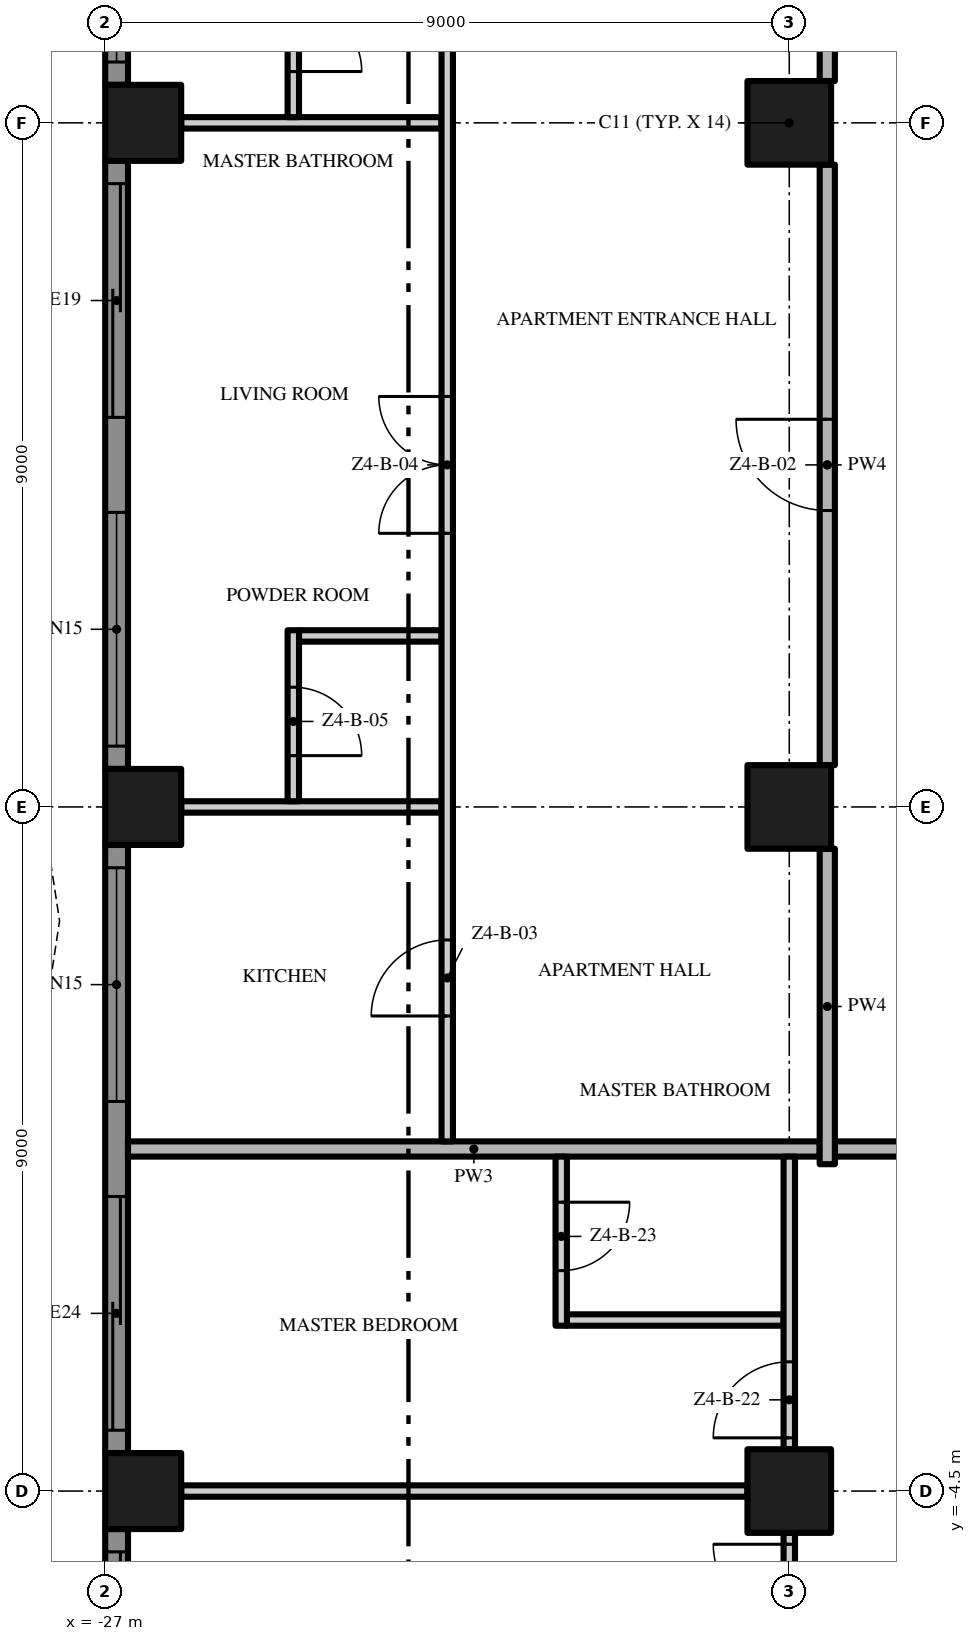
"""IFC4 building model, lengths in metres.
Left out: names, types, materials, properties, quantities, classifications, styles, units other than length and angle.
Written with IfcOpenShell. Run it as: python <this file> out.ifc"""

import sys

from ifc_helpers import new_model, si_unit, direction, frame, frame_2d, origin, origin_2d, place, context, subcontext, project, spatial, polyline, rectangle, outline, extrude, element, fill, save


model = new_model("IFC4")
c1 = context("Model", 3, precision=1e-05, world=origin(), true_north=direction((0.0, 1.0)))
c2 = subcontext(c1, "Body", "Model", "MODEL_VIEW")
j1 = project(units=[si_unit("LENGTHUNIT", "METRE"), si_unit("PLANEANGLEUNIT", "RADIAN")], contexts=[c1])
p1 = place(None, origin())
s1 = spatial("IfcSite", under=j1, at=p1, CompositionType="ELEMENT")
p2 = place(p1, origin())
s2 = spatial("IfcBuilding", under=s1, at=p2, CompositionType="ELEMENT")
p3 = place(p2, frame((0.0, 0.0, 203.4)))
s3 = spatial("IfcBuildingStorey", under=s2, at=p3, CompositionType="ELEMENT", Elevation=203.4)
for number, where, z_axis, x_axis in (
    (1, (-18.0, -4.5, 0.0), (0.0, 0.0, 1.0), (1.0, 0.0, 0.0)),
    (2, (-18.0, 13.5, 0.0), (0.0, 0.0, 1.0), (1.0, 0.0, 0.0)),
    (3, (-18.0, 4.5, 0.0), (0.0, 0.0, 1.0), (1.0, 0.0, 0.0)),
):
    element("IfcColumn", number, at=place(p3, frame(where, z_axis=z_axis, x_axis=x_axis)), inside=s3, PredefinedType="COLUMN", context=c2, shape_type="SweptSolid", body=[
        extrude(rectangle(XDim=1.1, YDim=1.1, at=origin_2d()), origin(), (0.0, 0.0, 1.0), 3.5),
    ])
for number, where, z_axis, x_axis in (
    (4, (-26.5, -4.5, 0.0), (0.0, 0.0, 1.0), (1.0, 0.0, 0.0)),
    (5, (-26.5, 13.5, 0.0), (0.0, 0.0, 1.0), (1.0, 0.0, 0.0)),
    (6, (-26.5, 4.5, 0.0), (0.0, 0.0, 1.0), (1.0, 0.0, 0.0)),
):
    element("IfcColumn", number, at=place(p3, frame(where, z_axis=z_axis, x_axis=x_axis)), inside=s3, PredefinedType="COLUMN", context=c2, shape_type="SweptSolid", body=[
        extrude(rectangle(XDim=1.0, YDim=1.0, at=origin_2d()), origin(), (0.0, 0.0, 1.0), 3.5),
    ])
p4 = place(p3, frame((-26.85, 14.0, 0.0), z_axis=(0.0, 0.0, 1.0), x_axis=(0.0, 1.0, 0.0)))
e7 = element("IfcWall", 7, at=p4, inside=s3, PredefinedType="SOLIDWALL", context=c2, shape_type="SweptSolid", body=[
    extrude(rectangle(XDim=3.7, YDim=0.3, at=frame_2d((1.85, 0.0))), origin(), (0.0, 0.0, 1.0), 3.5),
])
p5 = place(p4, frame((0.3, 0.0, 0.45)))
e8 = element("IfcOpeningElement", 8, at=p5, cuts=e7, PredefinedType="OPENING", context=c2, shape_type="SweptSolid", body=[
    extrude(rectangle(XDim=3.075, YDim=2.65, at=frame_2d((1.538, 1.325))), frame((0.0, 0.16, 0.0), z_axis=(0.0, -1.0, 0.0), x_axis=(1.0, 0.0, 0.0)), (0.0, 0.0, 1.0), 0.32),
])
p6 = place(p3, frame((-26.85, 5.0, 0.0), z_axis=(0.0, 0.0, 1.0), x_axis=(0.0, 1.0, 0.0)))
e9 = element("IfcWall", 9, at=p6, inside=s3, PredefinedType="SOLIDWALL", context=c2, shape_type="SweptSolid", body=[
    extrude(rectangle(XDim=8.0, YDim=0.3, at=frame_2d((4.0, 0.0))), origin(), (0.0, 0.0, 1.0), 3.5),
])
p7 = place(p6, frame((4.625, 0.0, 0.0)))
e10 = element("IfcOpeningElement", 10, at=p7, cuts=e9, PredefinedType="OPENING", context=c2, shape_type="SweptSolid", body=[
    extrude(rectangle(XDim=3.075, YDim=2.4, at=frame_2d((1.538, 1.2))), frame((0.0, 0.16, 0.0), z_axis=(0.0, -1.0, 0.0), x_axis=(1.0, 0.0, 0.0)), (0.0, 0.0, 1.0), 0.32),
])
p8 = place(p6, frame((0.3, 0.0, 0.45)))
e11 = element("IfcOpeningElement", 11, at=p8, cuts=e9, PredefinedType="OPENING", context=c2, shape_type="SweptSolid", body=[
    extrude(rectangle(XDim=3.075, YDim=2.65, at=frame_2d((1.538, 1.325))), frame((0.0, 0.16, 0.0), z_axis=(0.0, -1.0, 0.0), x_axis=(1.0, 0.0, 0.0)), (0.0, 0.0, 1.0), 0.32),
])
p9 = place(p3, frame((-26.85, -4.0, 0.0), z_axis=(0.0, 0.0, 1.0), x_axis=(0.0, 1.0, 0.0)))
e12 = element("IfcWall", 12, at=p9, inside=s3, PredefinedType="SOLIDWALL", context=c2, shape_type="SweptSolid", body=[
    extrude(rectangle(XDim=8.0, YDim=0.3, at=frame_2d((4.0, 0.0))), origin(), (0.0, 0.0, 1.0), 3.5),
])
p10 = place(p9, frame((4.625, 0.0, 0.45)))
e13 = element("IfcOpeningElement", 13, at=p10, cuts=e12, PredefinedType="OPENING", context=c2, shape_type="SweptSolid", body=[
    extrude(rectangle(XDim=3.075, YDim=2.65, at=frame_2d((1.538, 1.325))), frame((0.0, 0.16, 0.0), z_axis=(0.0, -1.0, 0.0), x_axis=(1.0, 0.0, 0.0)), (0.0, 0.0, 1.0), 0.32),
])
p11 = place(p9, frame((0.3, 0.0, 0.0)))
e14 = element("IfcOpeningElement", 14, at=p11, cuts=e12, PredefinedType="OPENING", context=c2, shape_type="SweptSolid", body=[
    extrude(rectangle(XDim=3.075, YDim=2.4, at=frame_2d((1.538, 1.2))), frame((0.0, 0.16, 0.0), z_axis=(0.0, -1.0, 0.0), x_axis=(1.0, 0.0, 0.0)), (0.0, 0.0, 1.0), 0.32),
])
p12 = place(p3, frame((-26.85, -13.0, 0.0), z_axis=(0.0, 0.0, 1.0), x_axis=(0.0, 1.0, 0.0)))
e15 = element("IfcWall", 15, at=p12, inside=s3, PredefinedType="SOLIDWALL", context=c2, shape_type="SweptSolid", body=[
    extrude(rectangle(XDim=8.0, YDim=0.3, at=frame_2d((4.0, 0.0))), origin(), (0.0, 0.0, 1.0), 3.5),
])
p13 = place(p12, frame((4.625, 0.0, 0.0)))
e16 = element("IfcOpeningElement", 16, at=p13, cuts=e15, PredefinedType="OPENING", context=c2, shape_type="SweptSolid", body=[
    extrude(rectangle(XDim=3.075, YDim=2.4, at=frame_2d((1.538, 1.2))), frame((0.0, 0.16, 0.0), z_axis=(0.0, -1.0, 0.0), x_axis=(1.0, 0.0, 0.0)), (0.0, 0.0, 1.0), 0.32),
])
p14 = place(p12, frame((0.3, 0.0, 0.45)))
e17 = element("IfcOpeningElement", 17, at=p14, cuts=e15, PredefinedType="OPENING", context=c2, shape_type="SweptSolid", body=[
    extrude(rectangle(XDim=3.075, YDim=2.65, at=frame_2d((1.538, 1.325))), frame((0.0, 0.16, 0.0), z_axis=(0.0, -1.0, 0.0), x_axis=(1.0, 0.0, 0.0)), (0.0, 0.0, 1.0), 0.32),
])
p15 = place(p3, origin())
e18 = element("IfcWall", 18, at=p15, inside=s3, PredefinedType="USERDEFINED", context=c2, shape_type="SweptSolid", body=[
    extrude(outline(polyline([(-27.6, 18.0), (-27.829, 16.5), (-28.429, 15.0), (-29.171, 13.5), (-29.771, 12.0), (-30.0, 10.5), (-29.771, 9.0), (-29.171, 7.5), (-28.429, 6.0), (-27.829, 4.5), (-27.6, 3.0), (-27.829, 1.5), (-28.429, 0.0), (-29.171, -1.5), (-29.771, -3.0), (-30.0, -4.5), (-29.771, -6.0), (-29.171, -7.5), (-28.429, -9.0), (-27.829, -10.5), (-27.6, -12.0), (-27.829, -13.5), (-28.429, -15.0), (-29.171, -16.5), (-29.771, -18.0), (-29.539, -18.093), (-28.942, -16.602), (-28.201, -15.102), (-27.586, -13.566), (-27.347, -12.0), (-27.586, -10.434), (-28.201, -8.898), (-28.942, -7.398), (-29.528, -5.934), (-29.747, -4.5), (-29.528, -3.066), (-28.942, -1.602), (-28.201, -0.102), (-27.586, 1.434), (-27.347, 3.0), (-27.586, 4.566), (-28.201, 6.102), (-28.942, 7.602), (-29.528, 9.066), (-29.747, 10.5), (-29.528, 11.934), (-28.942, 13.398), (-28.201, 14.898), (-27.586, 16.434), (-27.353, 17.962), (-27.6, 18.0)])), origin(), (0.0, 0.0, 1.0), 0.9),
])
p16 = place(p3, frame((-26.0, -4.5, 0.0), z_axis=(0.0, 0.0, 1.0), x_axis=(1.0, 0.0, 0.0)))
e19 = element("IfcWall", 19, at=p16, inside=s3, PredefinedType="PARTITIONING", context=c2, shape_type="SweptSolid", body=[
    extrude(rectangle(XDim=7.45, YDim=0.15, at=frame_2d((3.725, 0.0))), origin(), (0.0, 0.0, 1.0), 3.5),
])
p17 = place(p3, frame((-20.925, -2.25, 0.0), z_axis=(0.0, 0.0, 1.0), x_axis=(1.0, 0.0, 0.0)))
e20 = element("IfcWall", 20, at=p17, inside=s3, PredefinedType="PARTITIONING", context=c2, shape_type="SweptSolid", body=[
    extrude(rectangle(XDim=2.85, YDim=0.15, at=frame_2d((1.425, 0.0))), origin(), (0.0, 0.0, 1.0), 3.5),
])
p18 = place(p3, frame((-17.4, 0.0, 0.0), z_axis=(0.0, 0.0, 1.0), x_axis=(1.0, 0.0, 0.0)))
e21 = element("IfcWall", 21, at=p18, inside=s3, PredefinedType="PARTITIONING", context=c2, shape_type="SweptSolid", body=[
    extrude(rectangle(XDim=12.8, YDim=0.2, at=frame_2d((6.4, 0.0))), origin(), (0.0, 0.0, 1.0), 3.5),
])
p19 = place(p3, frame((-26.7, 0.0, 0.0), z_axis=(0.0, 0.0, 1.0), x_axis=(1.0, 0.0, 0.0)))
e22 = element("IfcWall", 22, at=p19, inside=s3, PredefinedType="PARTITIONING", context=c2, shape_type="SweptSolid", body=[
    extrude(rectangle(XDim=9.1, YDim=0.2, at=frame_2d((4.55, 0.0))), origin(), (0.0, 0.0, 1.0), 3.5),
])
p20 = place(p3, frame((-26.0, 4.5, 0.0), z_axis=(0.0, 0.0, 1.0), x_axis=(1.0, 0.0, 0.0)))
e23 = element("IfcWall", 23, at=p20, inside=s3, PredefinedType="PARTITIONING", context=c2, shape_type="SweptSolid", body=[
    extrude(rectangle(XDim=3.425, YDim=0.15, at=frame_2d((1.712, 0.0))), origin(), (0.0, 0.0, 1.0), 3.5),
])
p21 = place(p3, frame((-24.45, 6.75, 0.0), z_axis=(0.0, 0.0, 1.0), x_axis=(1.0, 0.0, 0.0)))
e24 = element("IfcWall", 24, at=p21, inside=s3, PredefinedType="PARTITIONING", context=c2, shape_type="SweptSolid", body=[
    extrude(rectangle(XDim=1.875, YDim=0.15, at=frame_2d((0.938, 0.0))), origin(), (0.0, 0.0, 1.0), 3.5),
])
p22 = place(p3, frame((-26.0, 13.5, 0.0), z_axis=(0.0, 0.0, 1.0), x_axis=(1.0, 0.0, 0.0)))
e25 = element("IfcWall", 25, at=p22, inside=s3, PredefinedType="PARTITIONING", context=c2, shape_type="SweptSolid", body=[
    extrude(rectangle(XDim=3.425, YDim=0.15, at=frame_2d((1.712, 0.0))), origin(), (0.0, 0.0, 1.0), 3.5),
])
p23 = place(p3, frame((-24.525, 6.825, 0.0), z_axis=(0.0, 0.0, 1.0), x_axis=(0.0, -1.0, 0.0)))
e26 = element("IfcWall", 26, at=p23, inside=s3, PredefinedType="PARTITIONING", context=c2, shape_type="SweptSolid", body=[
    extrude(rectangle(XDim=2.25, YDim=0.15, at=frame_2d((1.125, 0.0))), origin(), (0.0, 0.0, 1.0), 3.5),
])
p24 = place(p23, frame((0.75, 0.0, 0.0)))
e27 = element("IfcOpeningElement", 27, at=p24, cuts=e26, PredefinedType="OPENING", context=c2, shape_type="SweptSolid", body=[
    extrude(rectangle(XDim=0.9, YDim=2.1, at=frame_2d((0.45, 1.05))), frame((0.0, 0.085, 0.0), z_axis=(0.0, -1.0, 0.0), x_axis=(1.0, 0.0, 0.0)), (0.0, 0.0, 1.0), 0.17),
])
p25 = place(p3, frame((-24.525, 15.825, 0.0), z_axis=(0.0, 0.0, 1.0), x_axis=(0.0, -1.0, 0.0)))
e28 = element("IfcWall", 28, at=p25, inside=s3, PredefinedType="PARTITIONING", context=c2, shape_type="SweptSolid", body=[
    extrude(rectangle(XDim=2.25, YDim=0.15, at=frame_2d((1.125, 0.0))), origin(), (0.0, 0.0, 1.0), 3.5),
])
p26 = place(p25, frame((0.75, 0.0, 0.0)))
e29 = element("IfcOpeningElement", 29, at=p26, cuts=e28, PredefinedType="OPENING", context=c2, shape_type="SweptSolid", body=[
    extrude(rectangle(XDim=0.9, YDim=2.1, at=frame_2d((0.45, 1.05))), frame((0.0, 0.085, 0.0), z_axis=(0.0, -1.0, 0.0), x_axis=(1.0, 0.0, 0.0)), (0.0, 0.0, 1.0), 0.17),
])
p27 = place(p3, frame((-22.5, 0.1, 0.0), z_axis=(0.0, 0.0, 1.0), x_axis=(0.0, 1.0, 0.0)))
e30 = element("IfcWall", 30, at=p27, inside=s3, PredefinedType="PARTITIONING", context=c2, shape_type="SweptSolid", body=[
    extrude(rectangle(XDim=17.4, YDim=0.15, at=frame_2d((8.7, 0.0))), origin(), (0.0, 0.0, 1.0), 3.5),
])
p28 = place(p27, frame((1.65, 0.0, 0.0)))
e31 = element("IfcOpeningElement", 31, at=p28, cuts=e30, PredefinedType="OPENING", context=c2, shape_type="SweptSolid", body=[
    extrude(rectangle(XDim=1.0, YDim=2.4, at=frame_2d((0.5, 1.2))), frame((0.0, 0.085, 0.0), z_axis=(0.0, -1.0, 0.0), x_axis=(1.0, 0.0, 0.0)), (0.0, 0.0, 1.0), 0.17),
])
p29 = place(p27, frame((8.0, 0.0, 0.0)))
e32 = element("IfcOpeningElement", 32, at=p29, cuts=e30, PredefinedType="OPENING", context=c2, shape_type="SweptSolid", body=[
    extrude(rectangle(XDim=1.8, YDim=2.4, at=frame_2d((0.9, 1.2))), frame((0.0, 0.085, 0.0), z_axis=(0.0, -1.0, 0.0), x_axis=(1.0, 0.0, 0.0)), (0.0, 0.0, 1.0), 0.17),
])
p30 = place(p3, frame((-21.0, -0.1, 0.0), z_axis=(0.0, 0.0, 1.0), x_axis=(0.0, -1.0, 0.0)))
e33 = element("IfcWall", 33, at=p30, inside=s3, PredefinedType="PARTITIONING", context=c2, shape_type="SweptSolid", body=[
    extrude(rectangle(XDim=2.225, YDim=0.15, at=frame_2d((1.113, 0.0))), origin(), (0.0, 0.0, 1.0), 3.5),
])
p31 = place(p30, frame((0.6, 0.0, 0.0)))
e34 = element("IfcOpeningElement", 34, at=p31, cuts=e33, PredefinedType="OPENING", context=c2, shape_type="SweptSolid", body=[
    extrude(rectangle(XDim=0.9, YDim=2.1, at=frame_2d((0.45, 1.05))), frame((0.0, 0.085, 0.0), z_axis=(0.0, -1.0, 0.0), x_axis=(1.0, 0.0, 0.0)), (0.0, 0.0, 1.0), 0.17),
])
p32 = place(p3, frame((-18.0, -12.95, 0.0), z_axis=(0.0, 0.0, 1.0), x_axis=(0.0, 1.0, 0.0)))
e35 = element("IfcWall", 35, at=p32, inside=s3, PredefinedType="PARTITIONING", context=c2, shape_type="SweptSolid", body=[
    extrude(rectangle(XDim=7.9, YDim=0.15, at=frame_2d((3.95, 0.0))), origin(), (0.0, 0.0, 1.0), 3.5),
])
p33 = place(p32, frame((6.75, 0.0, 0.0)))
e36 = element("IfcOpeningElement", 36, at=p33, cuts=e35, PredefinedType="OPENING", context=c2, shape_type="SweptSolid", body=[
    extrude(rectangle(XDim=1.0, YDim=2.4, at=frame_2d((0.5, 1.2))), frame((0.0, 0.085, 0.0), z_axis=(0.0, -1.0, 0.0), x_axis=(1.0, 0.0, 0.0)), (0.0, 0.0, 1.0), 0.17),
])
p34 = place(p32, frame((0.15, 0.0, 0.0)))
e37 = element("IfcOpeningElement", 37, at=p34, cuts=e35, PredefinedType="OPENING", context=c2, shape_type="SweptSolid", body=[
    extrude(rectangle(XDim=1.0, YDim=2.4, at=frame_2d((0.5, 1.2))), frame((0.0, 0.085, 0.0), z_axis=(0.0, -1.0, 0.0), x_axis=(1.0, 0.0, 0.0)), (0.0, 0.0, 1.0), 0.17),
])
p35 = place(p3, frame((-18.0, -3.95, 0.0), z_axis=(0.0, 0.0, 1.0), x_axis=(0.0, 1.0, 0.0)))
e38 = element("IfcWall", 38, at=p35, inside=s3, PredefinedType="PARTITIONING", context=c2, shape_type="SweptSolid", body=[
    extrude(rectangle(XDim=3.85, YDim=0.15, at=frame_2d((1.925, 0.0))), origin(), (0.0, 0.0, 1.0), 3.5),
])
p36 = place(p35, frame((0.15, 0.0, 0.0)))
e39 = element("IfcOpeningElement", 39, at=p36, cuts=e38, PredefinedType="OPENING", context=c2, shape_type="SweptSolid", body=[
    extrude(rectangle(XDim=1.0, YDim=2.4, at=frame_2d((0.5, 1.2))), frame((0.0, 0.085, 0.0), z_axis=(0.0, -1.0, 0.0), x_axis=(1.0, 0.0, 0.0)), (0.0, 0.0, 1.0), 0.17),
])
p37 = place(p3, frame((-17.5, -0.2, 0.0), z_axis=(0.0, 0.0, 1.0), x_axis=(0.0, 1.0, 0.0)))
e40 = element("IfcWall", 40, at=p37, inside=s3, PredefinedType="PARTITIONING", context=c2, shape_type="SweptSolid", body=[
    extrude(rectangle(XDim=4.15, YDim=0.2, at=frame_2d((2.075, 0.0))), origin(), (0.0, 0.0, 1.0), 3.5),
])
p38 = place(p3, frame((-17.5, 5.05, 0.0), z_axis=(0.0, 0.0, 1.0), x_axis=(0.0, 1.0, 0.0)))
e41 = element("IfcWall", 41, at=p38, inside=s3, PredefinedType="PARTITIONING", context=c2, shape_type="SweptSolid", body=[
    extrude(rectangle(XDim=7.9, YDim=0.2, at=frame_2d((3.95, 0.0))), origin(), (0.0, 0.0, 1.0), 3.5),
])
p39 = place(p38, frame((3.35, 0.0, 0.0)))
e42 = element("IfcOpeningElement", 42, at=p39, cuts=e41, PredefinedType="OPENING", context=c2, shape_type="SweptSolid", body=[
    extrude(rectangle(XDim=1.2, YDim=2.4, at=frame_2d((0.6, 1.2))), frame((0.0, 0.11, 0.0), z_axis=(0.0, -1.0, 0.0), x_axis=(1.0, 0.0, 0.0)), (0.0, 0.0, 1.0), 0.22),
])
p40 = place(p3, frame((-17.5, 14.05, 0.0), z_axis=(0.0, 0.0, 1.0), x_axis=(0.0, 1.0, 0.0)))
e43 = element("IfcWall", 43, at=p40, inside=s3, PredefinedType="PARTITIONING", context=c2, shape_type="SweptSolid", body=[
    extrude(rectangle(XDim=7.45, YDim=0.2, at=frame_2d((3.725, 0.0))), origin(), (0.0, 0.0, 1.0), 3.5),
])
p41 = place(p5, origin())
e44 = element("IfcWindow", 44, at=p41, inside=s3, PartitioningType="SINGLE_PANEL", PredefinedType="WINDOW", context=c2, shape_type="SweptSolid", body=[
    extrude(rectangle(XDim=3.075, YDim=2.65, at=frame_2d((1.538, 1.325))), frame((0.0, 0.03, 0.0), z_axis=(0.0, -1.0, 0.0), x_axis=(1.0, 0.0, 0.0)), (0.0, 0.0, 1.0), 0.06),
])
fill(e8, e44)
p42 = place(p7, origin())
e45 = element("IfcDoor", 45, at=p42, inside=s3, OperationType="SINGLE_SWING_LEFT", PredefinedType="DOOR", context=c2, shape_type="SweptSolid", body=[
    extrude(rectangle(XDim=3.075, YDim=2.4, at=frame_2d((1.538, 1.2))), frame((0.0, 0.025, 0.0), z_axis=(0.0, -1.0, 0.0), x_axis=(1.0, 0.0, 0.0)), (0.0, 0.0, 1.0), 0.05),
])
fill(e10, e45)
p43 = place(p8, origin())
e46 = element("IfcWindow", 46, at=p43, inside=s3, PartitioningType="SINGLE_PANEL", PredefinedType="WINDOW", context=c2, shape_type="SweptSolid", body=[
    extrude(rectangle(XDim=3.075, YDim=2.65, at=frame_2d((1.538, 1.325))), frame((0.0, 0.03, 0.0), z_axis=(0.0, -1.0, 0.0), x_axis=(1.0, 0.0, 0.0)), (0.0, 0.0, 1.0), 0.06),
])
fill(e11, e46)
p44 = place(p10, origin())
e47 = element("IfcWindow", 47, at=p44, inside=s3, PartitioningType="SINGLE_PANEL", PredefinedType="WINDOW", context=c2, shape_type="SweptSolid", body=[
    extrude(rectangle(XDim=3.075, YDim=2.65, at=frame_2d((1.538, 1.325))), frame((0.0, 0.03, 0.0), z_axis=(0.0, -1.0, 0.0), x_axis=(1.0, 0.0, 0.0)), (0.0, 0.0, 1.0), 0.06),
])
fill(e13, e47)
p45 = place(p11, origin())
e48 = element("IfcDoor", 48, at=p45, inside=s3, OperationType="SINGLE_SWING_LEFT", PredefinedType="DOOR", context=c2, shape_type="SweptSolid", body=[
    extrude(rectangle(XDim=3.075, YDim=2.4, at=frame_2d((1.538, 1.2))), frame((0.0, 0.025, 0.0), z_axis=(0.0, -1.0, 0.0), x_axis=(1.0, 0.0, 0.0)), (0.0, 0.0, 1.0), 0.05),
])
fill(e14, e48)
p46 = place(p13, origin())
e49 = element("IfcDoor", 49, at=p46, inside=s3, OperationType="SINGLE_SWING_LEFT", PredefinedType="DOOR", context=c2, shape_type="SweptSolid", body=[
    extrude(rectangle(XDim=3.075, YDim=2.4, at=frame_2d((1.538, 1.2))), frame((0.0, 0.025, 0.0), z_axis=(0.0, -1.0, 0.0), x_axis=(1.0, 0.0, 0.0)), (0.0, 0.0, 1.0), 0.05),
])
fill(e16, e49)
p47 = place(p39, origin())
e50 = element("IfcDoor", 50, at=p47, inside=s3, OperationType="SINGLE_SWING_RIGHT", PredefinedType="DOOR", context=c2, shape_type="SweptSolid", body=[
    extrude(rectangle(XDim=1.2, YDim=2.4, at=frame_2d((0.6, 1.2))), frame((0.0, 0.025, 0.0), z_axis=(0.0, -1.0, 0.0), x_axis=(1.0, 0.0, 0.0)), (0.0, 0.0, 1.0), 0.05),
])
fill(e42, e50)
p48 = place(p28, origin())
e51 = element("IfcDoor", 51, at=p48, inside=s3, OperationType="SINGLE_SWING_LEFT", PredefinedType="DOOR", context=c2, shape_type="SweptSolid", body=[
    extrude(rectangle(XDim=1.0, YDim=2.4, at=frame_2d((0.5, 1.2))), frame((0.0, 0.025, 0.0), z_axis=(0.0, -1.0, 0.0), x_axis=(1.0, 0.0, 0.0)), (0.0, 0.0, 1.0), 0.05),
])
fill(e31, e51)
p49 = place(p29, origin())
e52 = element("IfcDoor", 52, at=p49, inside=s3, OperationType="DOUBLE_DOOR_SINGLE_SWING", PredefinedType="DOOR", context=c2, shape_type="SweptSolid", body=[
    extrude(rectangle(XDim=1.8, YDim=2.4, at=frame_2d((0.9, 1.2))), frame((0.0, 0.025, 0.0), z_axis=(0.0, -1.0, 0.0), x_axis=(1.0, 0.0, 0.0)), (0.0, 0.0, 1.0), 0.05),
])
fill(e32, e52)
p50 = place(p24, origin())
e53 = element("IfcDoor", 53, at=p50, inside=s3, OperationType="SINGLE_SWING_RIGHT", PredefinedType="DOOR", context=c2, shape_type="SweptSolid", body=[
    extrude(rectangle(XDim=0.9, YDim=2.1, at=frame_2d((0.45, 1.05))), frame((0.0, 0.025, 0.0), z_axis=(0.0, -1.0, 0.0), x_axis=(1.0, 0.0, 0.0)), (0.0, 0.0, 1.0), 0.05),
])
fill(e27, e53)
p51 = place(p26, origin())
e54 = element("IfcDoor", 54, at=p51, inside=s3, OperationType="SINGLE_SWING_RIGHT", PredefinedType="DOOR", context=c2, shape_type="SweptSolid", body=[
    extrude(rectangle(XDim=0.9, YDim=2.1, at=frame_2d((0.45, 1.05))), frame((0.0, 0.025, 0.0), z_axis=(0.0, -1.0, 0.0), x_axis=(1.0, 0.0, 0.0)), (0.0, 0.0, 1.0), 0.05),
])
fill(e29, e54)
p52 = place(p36, origin())
e55 = element("IfcDoor", 55, at=p52, inside=s3, OperationType="SINGLE_SWING_LEFT", PredefinedType="DOOR", context=c2, shape_type="SweptSolid", body=[
    extrude(rectangle(XDim=1.0, YDim=2.4, at=frame_2d((0.5, 1.2))), frame((0.0, 0.025, 0.0), z_axis=(0.0, -1.0, 0.0), x_axis=(1.0, 0.0, 0.0)), (0.0, 0.0, 1.0), 0.05),
])
fill(e39, e55)
p53 = place(p31, origin())
e56 = element("IfcDoor", 56, at=p53, inside=s3, OperationType="SINGLE_SWING_LEFT", PredefinedType="DOOR", context=c2, shape_type="SweptSolid", body=[
    extrude(rectangle(XDim=0.9, YDim=2.1, at=frame_2d((0.45, 1.05))), frame((0.0, 0.025, 0.0), z_axis=(0.0, -1.0, 0.0), x_axis=(1.0, 0.0, 0.0)), (0.0, 0.0, 1.0), 0.05),
])
fill(e34, e56)
p54 = place(p33, origin())
e57 = element("IfcDoor", 57, at=p54, inside=s3, OperationType="SINGLE_SWING_RIGHT", PredefinedType="DOOR", context=c2, shape_type="SweptSolid", body=[
    extrude(rectangle(XDim=1.0, YDim=2.4, at=frame_2d((0.5, 1.2))), frame((0.0, 0.025, 0.0), z_axis=(0.0, -1.0, 0.0), x_axis=(1.0, 0.0, 0.0)), (0.0, 0.0, 1.0), 0.05),
])
fill(e36, e57)
save(model, sys.argv[1])
